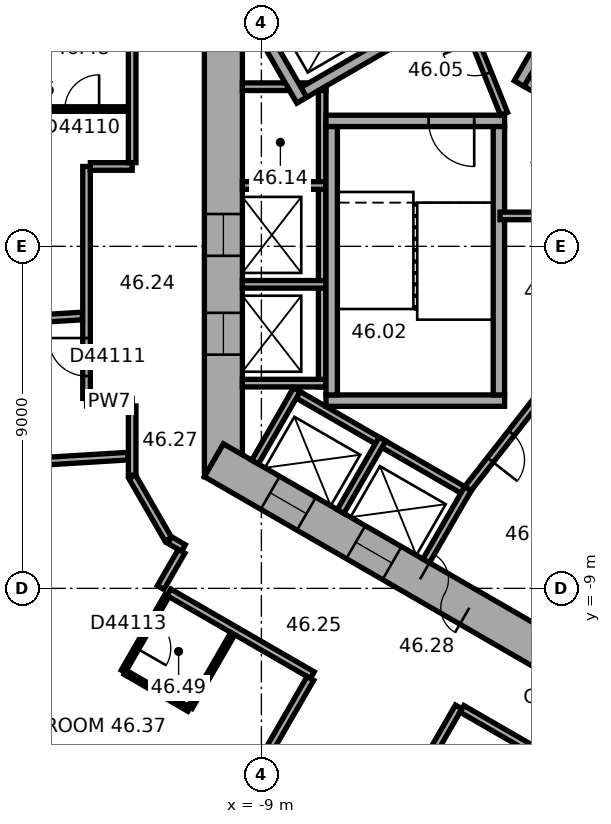
"""IFC4 building model, lengths in metres.
Left out: names, types, materials, properties, quantities, classifications, styles, units other than length and angle.
Written with IfcOpenShell. Run it as: python <this file> out.ifc"""

import sys

from ifc_helpers import new_model, si_unit, direction, frame, frame_2d, origin, place, context, subcontext, project, spatial, rectangle, extrude, element, fill, save


model = new_model("IFC4")
c1 = context("Model", 3, precision=1e-05, world=origin(), true_north=direction((0.0, 1.0)))
c2 = subcontext(c1, "Body", "Model", "MODEL_VIEW")
j1 = project(units=[si_unit("LENGTHUNIT", "METRE"), si_unit("PLANEANGLEUNIT", "RADIAN")], contexts=[c1])
p1 = place(None, origin())
s1 = spatial("IfcSite", under=j1, at=p1, CompositionType="ELEMENT")
p2 = place(p1, origin())
s2 = spatial("IfcBuilding", under=s1, at=p2, CompositionType="ELEMENT")
p3 = place(p2, frame((0.0, 0.0, 187.3)))
s3 = spatial("IfcBuildingStorey", under=s2, at=p3, CompositionType="ELEMENT", Elevation=187.3)
p4 = place(p3, frame((-10.0, 6.062, 0.0), z_axis=(0.0, 0.0, 1.0), x_axis=(0.0, -1.0, 0.0)))
e1 = element("IfcWall", 1, at=p4, inside=s3, PredefinedType="SHEAR", context=c2, shape_type="SweptSolid", body=[
    extrude(rectangle(XDim=12.125, YDim=1.0, at=frame_2d((6.062, 0.0))), origin(), (0.0, 0.0, 1.0), 3.7),
])
p5 = place(p4, frame((5.212, 0.0, 0.0)))
e2 = element("IfcOpeningElement", 2, at=p5, cuts=e1, PredefinedType="OPENING", context=c2, shape_type="SweptSolid", body=[
    extrude(rectangle(XDim=1.1, YDim=2.1, at=frame_2d((0.55, 1.05))), frame((0.0, 0.51, 0.0), z_axis=(0.0, -1.0, 0.0), x_axis=(1.0, 0.0, 0.0)), (0.0, 0.0, 1.0), 1.02),
])
p6 = place(p4, frame((7.812, 0.0, 0.0)))
e3 = element("IfcOpeningElement", 3, at=p6, cuts=e1, PredefinedType="OPENING", context=c2, shape_type="SweptSolid", body=[
    extrude(rectangle(XDim=1.1, YDim=2.1, at=frame_2d((0.55, 1.05))), frame((0.0, 0.51, 0.0), z_axis=(0.0, -1.0, 0.0), x_axis=(1.0, 0.0, 0.0)), (0.0, 0.0, 1.0), 1.02),
])
p7 = place(p3, frame((-10.25, -5.629, 0.0), z_axis=(0.0, 0.0, 1.0), x_axis=(0.866022616891, -0.50000482701, 0.0)))
e4 = element("IfcWall", 4, at=p7, inside=s3, PredefinedType="SHEAR", context=c2, shape_type="SweptSolid", body=[
    extrude(rectangle(XDim=12.125, YDim=1.0, at=frame_2d((6.062, 0.0))), origin(), (0.0, 0.0, 1.0), 3.7),
])
p8 = place(p7, frame((6.262, 0.0, 0.0)))
e5 = element("IfcOpeningElement", 5, at=p8, cuts=e4, PredefinedType="OPENING", context=c2, shape_type="SweptSolid", body=[
    extrude(rectangle(XDim=1.5, YDim=2.1, at=frame_2d((0.75, 1.05))), frame((0.0, 0.51, 0.0), z_axis=(0.0, -1.0, 0.0), x_axis=(1.0, 0.0, 0.0)), (0.0, 0.0, 1.0), 1.02),
])
p9 = place(p7, frame((1.712, 0.0, 0.0)))
e6 = element("IfcOpeningElement", 6, at=p9, cuts=e4, PredefinedType="OPENING", context=c2, shape_type="SweptSolid", body=[
    extrude(rectangle(XDim=1.1, YDim=2.1, at=frame_2d((0.55, 1.05))), frame((0.0, 0.51, 0.0), z_axis=(0.0, -1.0, 0.0), x_axis=(1.0, 0.0, 0.0)), (0.0, 0.0, 1.0), 1.02),
])
p10 = place(p7, frame((4.312, 0.0, 0.0)))
e7 = element("IfcOpeningElement", 7, at=p10, cuts=e4, PredefinedType="OPENING", context=c2, shape_type="SweptSolid", body=[
    extrude(rectangle(XDim=1.1, YDim=2.1, at=frame_2d((0.55, 1.05))), frame((0.0, 0.51, 0.0), z_axis=(0.0, -1.0, 0.0), x_axis=(1.0, 0.0, 0.0)), (0.0, 0.0, 1.0), 1.02),
])
p11 = place(p3, frame((-7.4, 4.3, 0.0), z_axis=(0.0, 0.0, 1.0), x_axis=(0.0, -1.0, 0.0)))
e8 = element("IfcWall", 8, at=p11, inside=s3, PredefinedType="PARTITIONING", context=c2, shape_type="SweptSolid", body=[
    extrude(rectangle(XDim=8.0, YDim=0.2, at=frame_2d((4.0, 0.0))), origin(), (0.0, 0.0, 1.0), 3.42),
])
for number, where, z_axis, x_axis in (
    (9, (-7.3, 4.2, 0.0), (0.0, 0.0, 1.0), (-1.0, 0.0, 0.0)),
    (10, (-7.3, 1.6, 0.0), (0.0, 0.0, 1.0), (-1.0, 0.0, 0.0)),
    (11, (-7.3, -1.0, 0.0), (0.0, 0.0, 1.0), (-1.0, 0.0, 0.0)),
    (12, (-7.3, -3.6, 0.0), (0.0, 0.0, 1.0), (-1.0, 0.0, 0.0)),
):
    element("IfcWall", number, at=place(p3, frame(where, z_axis=z_axis, x_axis=x_axis)), inside=s3, PredefinedType="PARTITIONING", context=c2, shape_type="SweptSolid", body=[
        extrude(rectangle(XDim=2.2, YDim=0.2, at=frame_2d((1.1, 0.0))), origin(), (0.0, 0.0, 1.0), 3.42),
    ])
p12 = place(p3, frame((-8.203, -3.809, 0.0), z_axis=(0.0, 0.0, 1.0), x_axis=(0.866028230842, -0.499995103361, 0.0)))
e13 = element("IfcWall", 13, at=p12, inside=s3, PredefinedType="PARTITIONING", context=c2, shape_type="SweptSolid", body=[
    extrude(rectangle(XDim=5.4, YDim=0.2, at=frame_2d((2.7, 0.0))), origin(), (0.0, 0.0, 1.0), 3.42),
])
for number, where, z_axis, x_axis in (
    (14, (-8.067, -3.772, 0.0), (0.0, 0.0, 1.0), (-0.5, -0.866, 0.0)),
    (15, (-5.815, -5.072, 0.0), (0.0, 0.0, 1.0), (-0.5, -0.866, 0.0)),
):
    element("IfcWall", number, at=place(p3, frame(where, z_axis=z_axis, x_axis=x_axis)), inside=s3, PredefinedType="PARTITIONING", context=c2, shape_type="SweptSolid", body=[
        extrude(rectangle(XDim=2.2, YDim=0.2, at=frame_2d((1.1, 0.0))), origin(), (0.0, 0.0, 1.0), 3.42),
    ])
p13 = place(p3, frame((-3.563, -6.372, 0.0), z_axis=(0.0, 0.0, 1.0), x_axis=(-0.499994660107, -0.866028486751, 0.0)))
e16 = element("IfcWall", 16, at=p13, inside=s3, PredefinedType="PARTITIONING", context=c2, shape_type="SweptSolid", body=[
    extrude(rectangle(XDim=2.2, YDim=0.2, at=frame_2d((1.1, 0.0))), origin(), (0.0, 0.0, 1.0), 3.42),
])
p14 = place(p3, frame((-2.216, 4.282, 0.0), z_axis=(0.0, 0.0, 1.0), x_axis=(0.499977259774, 0.866038532462, 0.0)))
e17 = element("IfcWall", 17, at=p14, inside=s3, PredefinedType="SHEAR", context=c2, shape_type="SweptSolid", body=[
    extrude(rectangle(XDim=4.7, YDim=0.3, at=frame_2d((2.35, 0.0))), origin(), (0.0, 0.0, 1.0), 3.42),
])
p15 = place(p3, frame((4.103, 0.807, 0.0), z_axis=(0.0, 0.0, 1.0), x_axis=(-0.866027801685, 0.499995846692, 0.0)))
e18 = element("IfcWall", 18, at=p15, inside=s3, PredefinedType="SHEAR", context=c2, shape_type="SweptSolid", body=[
    extrude(rectangle(XDim=7.06, YDim=0.3, at=frame_2d((3.53, 0.0))), origin(), (0.0, 0.0, 1.0), 3.42),
])
p16 = place(p3, frame((-2.6, 3.3, 0.0), z_axis=(0.0, 0.0, 1.0), x_axis=(-1.0, 0.0, 0.0)))
e19 = element("IfcWall", 19, at=p16, inside=s3, PredefinedType="SHEAR", context=c2, shape_type="SweptSolid", body=[
    extrude(rectangle(XDim=4.7, YDim=0.3, at=frame_2d((2.35, 0.0))), origin(), (0.0, 0.0, 1.0), 3.42),
])
p17 = place(p16, frame((0.8, 0.0, 0.0)))
e20 = element("IfcOpeningElement", 20, at=p17, cuts=e19, PredefinedType="OPENING", context=c2, shape_type="SweptSolid", body=[
    extrude(rectangle(XDim=1.2, YDim=2.1, at=frame_2d((0.6, 1.05))), frame((0.0, 0.16, 0.0), z_axis=(0.0, -1.0, 0.0), x_axis=(1.0, 0.0, 0.0)), (0.0, 0.0, 1.0), 0.32),
])
p18 = place(p3, frame((-2.6, -4.06, 0.0), z_axis=(0.0, 0.0, 1.0), x_axis=(-1.0, 0.0, 0.0)))
e21 = element("IfcWall", 21, at=p18, inside=s3, PredefinedType="SHEAR", context=c2, shape_type="SweptSolid", body=[
    extrude(rectangle(XDim=4.7, YDim=0.3, at=frame_2d((2.35, 0.0))), origin(), (0.0, 0.0, 1.0), 3.42),
])
for number, where, z_axis, x_axis in (
    (22, (-2.75, 3.15, 0.0), (0.0, 0.0, 1.0), (0.0, -1.0, 0.0)),
    (23, (-7.15, 3.15, 0.0), (0.0, 0.0, 1.0), (0.0, -1.0, 0.0)),
):
    element("IfcWall", number, at=place(p3, frame(where, z_axis=z_axis, x_axis=x_axis)), inside=s3, PredefinedType="SHEAR", context=c2, shape_type="SweptSolid", body=[
        extrude(rectangle(XDim=7.06, YDim=0.3, at=frame_2d((3.53, 0.0))), origin(), (0.0, 0.0, 1.0), 3.42),
    ])
p19 = place(p3, frame((-5.24, 5.577, 0.0), z_axis=(0.0, 0.0, 1.0), x_axis=(-0.866014461049, -0.500018952895, 0.0)))
e24 = element("IfcWall", 24, at=p19, inside=s3, PredefinedType="SHEAR", context=c2, shape_type="SweptSolid", body=[
    extrude(rectangle(XDim=3.35, YDim=0.3, at=frame_2d((1.675, 0.0))), origin(), (0.0, 0.0, 1.0), 3.42),
])
p20 = place(p3, frame((-7.937, 3.847, 0.0), z_axis=(0.0, 0.0, 1.0), x_axis=(-0.50002983664, 0.866008176907, 0.0)))
e25 = element("IfcWall", 25, at=p20, inside=s3, PredefinedType="SHEAR", context=c2, shape_type="SweptSolid", body=[
    extrude(rectangle(XDim=2.2, YDim=0.3, at=frame_2d((1.1, 0.0))), origin(), (0.0, 0.0, 1.0), 3.42),
])
p21 = place(p3, frame((-2.615, 3.487, 0.0), z_axis=(0.0, 0.0, 1.0), x_axis=(-0.373576831041, 0.92759924068, 0.0)))
e26 = element("IfcWall", 26, at=p21, inside=s3, PredefinedType="PARTITIONING", context=c2, shape_type="SweptSolid", body=[
    extrude(rectangle(XDim=3.002, YDim=0.2, at=frame_2d((1.501, 0.0))), origin(), (0.0, 0.0, 1.0), 3.42),
])
p22 = place(p21, frame((1.15, 0.0, 0.0)))
e27 = element("IfcOpeningElement", 27, at=p22, cuts=e26, PredefinedType="OPENING", context=c2, shape_type="SweptSolid", body=[
    extrude(rectangle(XDim=0.9, YDim=2.1, at=frame_2d((0.45, 1.05))), frame((0.0, 0.11, 0.0), z_axis=(0.0, -1.0, 0.0), x_axis=(1.0, 0.0, 0.0)), (0.0, 0.0, 1.0), 0.22),
])
p23 = place(p3, frame((-1.712, -4.008, 0.0), z_axis=(0.0, 0.0, 1.0), x_axis=(-0.616549420702, -0.787316208287, 0.0)))
e28 = element("IfcWall", 28, at=p23, inside=s3, PredefinedType="PARTITIONING", context=c2, shape_type="SweptSolid", body=[
    extrude(rectangle(XDim=3.002, YDim=0.2, at=frame_2d((1.501, 0.0))), origin(), (0.0, 0.0, 1.0), 3.42),
])
p24 = place(p23, frame((1.15, 0.0, 0.0)))
e29 = element("IfcOpeningElement", 29, at=p24, cuts=e28, PredefinedType="OPENING", context=c2, shape_type="SweptSolid", body=[
    extrude(rectangle(XDim=0.9, YDim=2.1, at=frame_2d((0.45, 1.05))), frame((0.0, 0.11, 0.0), z_axis=(0.0, -1.0, 0.0), x_axis=(1.0, 0.0, 0.0)), (0.0, 0.0, 1.0), 0.22),
])
p25 = place(p3, frame((0.92, 0.8, 0.0), z_axis=(0.0, 0.0, 1.0), x_axis=(-1.0, 0.0, 0.0)))
e30 = element("IfcWall", 30, at=p25, inside=s3, PredefinedType="PARTITIONING", context=c2, shape_type="SweptSolid", body=[
    extrude(rectangle(XDim=3.64, YDim=0.2, at=frame_2d((1.82, 0.0))), origin(), (0.0, 0.0, 1.0), 3.42),
])
p26 = place(p3, frame((-20.651, -2.258, 0.0), z_axis=(0.0, 0.0, 1.0), x_axis=(0.998133960965, 0.061062230286, 0.0)))
e31 = element("IfcWall", 31, at=p26, inside=s3, PredefinedType="PARTITIONING", context=c2, shape_type="SweptSolid", body=[
    extrude(rectangle(XDim=6.953, YDim=0.2, at=frame_2d((3.477, 0.0))), origin(), (0.0, 0.0, 1.0), 3.42),
])
p27 = place(p3, frame((-20.421, -6.005, 0.0), z_axis=(0.0, 0.0, 1.0), x_axis=(0.998134865741, 0.061047438866, 0.0)))
e32 = element("IfcWall", 32, at=p27, inside=s3, PredefinedType="PARTITIONING", context=c2, shape_type="SweptSolid", body=[
    extrude(rectangle(XDim=7.927, YDim=0.2, at=frame_2d((3.963, 0.0))), origin(), (0.0, 0.0, 1.0), 2.87),
])
p28 = place(p3, frame((-13.601, -4.101, 0.0), z_axis=(0.0, 0.0, 1.0), x_axis=(1.0, 0.0, 0.0)))
e33 = element("IfcWall", 33, at=p28, inside=s3, PredefinedType="PARTITIONING", context=c2, shape_type="SweptSolid", body=[
    extrude(rectangle(XDim=1.201, YDim=0.2, at=frame_2d((0.601, 0.0))), origin(), (0.0, 0.0, 1.0), 3.42),
])
p29 = place(p3, frame((-13.601, 2.101, 0.0), z_axis=(0.0, 0.0, 1.0), x_axis=(0.0, -1.0, 0.0)))
e34 = element("IfcWall", 34, at=p29, inside=s3, PredefinedType="PARTITIONING", context=c2, shape_type="SweptSolid", body=[
    extrude(rectangle(XDim=6.102, YDim=0.2, at=frame_2d((3.051, 0.0))), origin(), (0.0, 0.0, 1.0), 3.42),
])
p30 = place(p29, frame((4.515, 0.0, 0.0)))
e35 = element("IfcOpeningElement", 35, at=p30, cuts=e34, PredefinedType="OPENING", context=c2, shape_type="SweptSolid", body=[
    extrude(rectangle(XDim=1.0, YDim=2.1, at=frame_2d((0.5, 1.05))), frame((0.0, 0.11, 0.0), z_axis=(0.0, -1.0, 0.0), x_axis=(1.0, 0.0, 0.0)), (0.0, 0.0, 1.0), 0.22),
])
p31 = place(p3, frame((-12.635, -11.182, 0.0), z_axis=(0.0, 0.0, 1.0), x_axis=(0.499952165731, 0.866053019151, 0.0)))
e36 = element("IfcWall", 36, at=p31, inside=s3, PredefinedType="PARTITIONING", context=c2, shape_type="SweptSolid", body=[
    extrude(rectangle(XDim=2.3, YDim=0.12, at=frame_2d((1.15, 0.0))), origin(), (0.0, 0.0, 1.0), 3.42),
])
p32 = place(p31, frame((0.7, 0.0, 0.0)))
e37 = element("IfcOpeningElement", 37, at=p32, cuts=e36, PredefinedType="OPENING", context=c2, shape_type="SweptSolid", body=[
    extrude(rectangle(XDim=0.9, YDim=2.1, at=frame_2d((0.45, 1.05))), frame((0.0, 0.07, 0.0), z_axis=(0.0, -1.0, 0.0), x_axis=(1.0, 0.0, 0.0)), (0.0, 0.0, 1.0), 0.14),
])
p33 = place(p3, frame((-12.5, 3.612, 0.0), z_axis=(0.0, 0.0, 1.0), x_axis=(-1.0, 0.0, 0.0)))
e38 = element("IfcWall", 38, at=p33, inside=s3, PredefinedType="PARTITIONING", context=c2, shape_type="SweptSolid", body=[
    extrude(rectangle(XDim=2.44, YDim=0.12, at=frame_2d((1.22, 0.0))), origin(), (0.0, 0.0, 1.0), 3.42),
])
p34 = place(p33, frame((0.77, 0.0, 0.0)))
e39 = element("IfcOpeningElement", 39, at=p34, cuts=e38, PredefinedType="OPENING", context=c2, shape_type="SweptSolid", body=[
    extrude(rectangle(XDim=0.9, YDim=2.1, at=frame_2d((0.45, 1.05))), frame((0.0, 0.07, 0.0), z_axis=(0.0, -1.0, 0.0), x_axis=(1.0, 0.0, 0.0)), (0.0, 0.0, 1.0), 0.14),
])
p35 = place(p3, frame((-12.4, -6.062, 0.0), z_axis=(0.0, 0.0, 1.0), x_axis=(0.500022797313, -0.86601224135, 0.0)))
e40 = element("IfcWall", 40, at=p35, inside=s3, PredefinedType="PARTITIONING", context=c2, shape_type="SweptSolid", body=[
    extrude(rectangle(XDim=1.9, YDim=0.2, at=frame_2d((0.95, 0.0))), origin(), (0.0, 0.0, 1.0), 3.42),
])
p36 = place(p3, frame((-12.4, -4.201, 0.0), z_axis=(0.0, 0.0, 1.0), x_axis=(0.0, -1.0, 0.0)))
e41 = element("IfcWall", 41, at=p36, inside=s3, PredefinedType="PARTITIONING", context=c2, shape_type="SweptSolid", body=[
    extrude(rectangle(XDim=1.821, YDim=0.2, at=frame_2d((0.911, 0.0))), origin(), (0.0, 0.0, 1.0), 3.42),
])
p37 = place(p3, frame((-12.4, 2.101, 0.0), z_axis=(0.0, 0.0, 1.0), x_axis=(-1.0, 0.0, 0.0)))
e42 = element("IfcWall", 42, at=p37, inside=s3, PredefinedType="PARTITIONING", context=c2, shape_type="SweptSolid", body=[
    extrude(rectangle(XDim=1.101, YDim=0.2, at=frame_2d((0.551, 0.0))), origin(), (0.0, 0.0, 1.0), 3.42),
])
p38 = place(p3, frame((-12.4, 5.812, 0.0), z_axis=(0.0, 0.0, 1.0), x_axis=(0.0, -1.0, 0.0)))
e43 = element("IfcWall", 43, at=p38, inside=s3, PredefinedType="PARTITIONING", context=c2, shape_type="SweptSolid", body=[
    extrude(rectangle(XDim=3.611, YDim=0.2, at=frame_2d((1.806, 0.0))), origin(), (0.0, 0.0, 1.0), 3.42),
])
p39 = place(p3, frame((-11.435, -9.103, 0.0), z_axis=(0.0, 0.0, 1.0), x_axis=(0.866007399799, -0.500031182522, 0.0)))
e44 = element("IfcWall", 44, at=p39, inside=s3, PredefinedType="PARTITIONING", context=c2, shape_type="SweptSolid", body=[
    extrude(rectangle(XDim=4.358, YDim=0.2, at=frame_2d((2.179, 0.0))), origin(), (0.0, 0.0, 1.0), 3.42),
])
p40 = place(p3, frame((-11.415, -7.728, 0.0), z_axis=(0.0, 0.0, 1.0), x_axis=(0.865915281873, -0.500190688257, 0.0)))
e45 = element("IfcWall", 45, at=p40, inside=s3, PredefinedType="PARTITIONING", context=c2, shape_type="SweptSolid", body=[
    extrude(rectangle(XDim=0.421, YDim=0.2, at=frame_2d((0.21, 0.0))), origin(), (0.0, 0.0, 1.0), 3.42),
])
p41 = place(p3, frame((-11.235, -17.474, 0.0), z_axis=(0.0, 0.0, 1.0), x_axis=(0.500009260695, 0.866020057054, 0.0)))
e46 = element("IfcWall", 46, at=p41, inside=s3, PredefinedType="PARTITIONING", context=c2, shape_type="SweptSolid", body=[
    extrude(rectangle(XDim=7.049, YDim=0.2, at=frame_2d((3.524, 0.0))), origin(), (0.0, 0.0, 1.0), 2.87),
])
p42 = place(p41, frame((3.024, 0.0, 0.0)))
e47 = element("IfcOpeningElement", 47, at=p42, cuts=e46, PredefinedType="OPENING", context=c2, shape_type="SweptSolid", body=[
    extrude(rectangle(XDim=1.0, YDim=2.1, at=frame_2d((0.5, 1.05))), frame((0.0, 0.11, 0.0), z_axis=(0.0, -1.0, 0.0), x_axis=(1.0, 0.0, 0.0)), (0.0, 0.0, 1.0), 0.22),
])
p43 = place(p3, frame((-11.101, -8.025, 0.0), z_axis=(0.0, 0.0, 1.0), x_axis=(-0.500074377092, -0.865982457891, 0.0)))
e48 = element("IfcWall", 48, at=p43, inside=s3, PredefinedType="PARTITIONING", context=c2, shape_type="SweptSolid", body=[
    extrude(rectangle(XDim=1.101, YDim=0.2, at=frame_2d((0.55, 0.0))), origin(), (0.0, 0.0, 1.0), 3.42),
])
p44 = place(p3, frame((-10.903, -12.182, 0.0), z_axis=(0.0, 0.0, 1.0), x_axis=(-0.866011626733, 0.500023861795, 0.0)))
e49 = element("IfcWall", 49, at=p44, inside=s3, PredefinedType="PARTITIONING", context=c2, shape_type="SweptSolid", body=[
    extrude(rectangle(XDim=1.94, YDim=0.12, at=frame_2d((0.97, 0.0))), origin(), (0.0, 0.0, 1.0), 3.42),
])
p45 = place(p3, frame((-9.753, -10.19, 0.0), z_axis=(0.0, 0.0, 1.0), x_axis=(-0.49994888933, -0.866054910533, 0.0)))
e50 = element("IfcWall", 50, at=p45, inside=s3, PredefinedType="PARTITIONING", context=c2, shape_type="SweptSolid", body=[
    extrude(rectangle(XDim=2.24, YDim=0.12, at=frame_2d((1.12, 0.0))), origin(), (0.0, 0.0, 1.0), 3.42),
])
p46 = place(p3, frame((-7.984, -19.351, 0.0), z_axis=(0.0, 0.0, 1.0), x_axis=(0.500010139422, 0.866019549707, 0.0)))
e51 = element("IfcWall", 51, at=p46, inside=s3, PredefinedType="PARTITIONING", context=c2, shape_type="SweptSolid", body=[
    extrude(rectangle(XDim=8.35, YDim=0.2, at=frame_2d((4.175, 0.0))), origin(), (0.0, 0.0, 1.0), 3.42),
])
p47 = place(p46, frame((3.675, 0.0, 0.0)))
e52 = element("IfcOpeningElement", 52, at=p47, cuts=e51, PredefinedType="OPENING", context=c2, shape_type="SweptSolid", body=[
    extrude(rectangle(XDim=1.0, YDim=2.1, at=frame_2d((0.5, 1.05))), frame((0.0, 0.11, 0.0), z_axis=(0.0, -1.0, 0.0), x_axis=(1.0, 0.0, 0.0)), (0.0, 0.0, 1.0), 0.22),
])
p48 = place(p3, frame((-3.722, -12.169, 0.0), z_axis=(0.0, 0.0, 1.0), x_axis=(0.866033163891, -0.499986558861, 0.0)))
e53 = element("IfcWall", 53, at=p48, inside=s3, PredefinedType="PARTITIONING", context=c2, shape_type="SweptSolid", body=[
    extrude(rectangle(XDim=3.201, YDim=0.2, at=frame_2d((1.6, 0.0))), origin(), (0.0, 0.0, 1.0), 3.42),
])
p49 = place(p8, origin())
e54 = element("IfcDoor", 54, at=p49, inside=s3, OperationType="DOUBLE_DOOR_SINGLE_SWING", PredefinedType="DOOR", context=c2, shape_type="SweptSolid", body=[
    extrude(rectangle(XDim=1.5, YDim=2.1, at=frame_2d((0.75, 1.05))), frame((0.0, 0.025, 0.0), z_axis=(0.0, -1.0, 0.0), x_axis=(1.0, 0.0, 0.0)), (0.0, 0.0, 1.0), 0.05),
])
fill(e5, e54)
p50 = place(p17, origin())
e55 = element("IfcDoor", 55, at=p50, inside=s3, OperationType="SINGLE_SWING_RIGHT", PredefinedType="DOOR", context=c2, shape_type="SweptSolid", body=[
    extrude(rectangle(XDim=1.2, YDim=2.1, at=frame_2d((0.6, 1.05))), frame((0.0, 0.025, 0.0), z_axis=(0.0, -1.0, 0.0), x_axis=(1.0, 0.0, 0.0)), (0.0, 0.0, 1.0), 0.05),
])
fill(e20, e55)
p51 = place(p22, origin())
e56 = element("IfcDoor", 56, at=p51, inside=s3, OperationType="SINGLE_SWING_LEFT", PredefinedType="DOOR", context=c2, shape_type="SweptSolid", body=[
    extrude(rectangle(XDim=0.9, YDim=2.1, at=frame_2d((0.45, 1.05))), frame((0.0, 0.025, 0.0), z_axis=(0.0, -1.0, 0.0), x_axis=(1.0, 0.0, 0.0)), (0.0, 0.0, 1.0), 0.05),
])
fill(e27, e56)
p52 = place(p24, origin())
e57 = element("IfcDoor", 57, at=p52, inside=s3, OperationType="SINGLE_SWING_LEFT", PredefinedType="DOOR", context=c2, shape_type="SweptSolid", body=[
    extrude(rectangle(XDim=0.9, YDim=2.1, at=frame_2d((0.45, 1.05))), frame((0.0, 0.025, 0.0), z_axis=(0.0, -1.0, 0.0), x_axis=(1.0, 0.0, 0.0)), (0.0, 0.0, 1.0), 0.05),
])
fill(e29, e57)
p53 = place(p5, origin())
e58 = element("IfcDoor", 58, at=p53, inside=s3, OperationType="DOUBLE_DOOR_SLIDING", PredefinedType="DOOR", context=c2, shape_type="SweptSolid", body=[
    extrude(rectangle(XDim=1.1, YDim=2.1, at=frame_2d((0.55, 1.05))), frame((0.0, 0.025, 0.0), z_axis=(0.0, -1.0, 0.0), x_axis=(1.0, 0.0, 0.0)), (0.0, 0.0, 1.0), 0.05),
])
fill(e2, e58)
p54 = place(p6, origin())
e59 = element("IfcDoor", 59, at=p54, inside=s3, OperationType="DOUBLE_DOOR_SLIDING", PredefinedType="DOOR", context=c2, shape_type="SweptSolid", body=[
    extrude(rectangle(XDim=1.1, YDim=2.1, at=frame_2d((0.55, 1.05))), frame((0.0, 0.025, 0.0), z_axis=(0.0, -1.0, 0.0), x_axis=(1.0, 0.0, 0.0)), (0.0, 0.0, 1.0), 0.05),
])
fill(e3, e59)
p55 = place(p9, origin())
e60 = element("IfcDoor", 60, at=p55, inside=s3, OperationType="DOUBLE_DOOR_SLIDING", PredefinedType="DOOR", context=c2, shape_type="SweptSolid", body=[
    extrude(rectangle(XDim=1.1, YDim=2.1, at=frame_2d((0.55, 1.05))), frame((0.0, 0.025, 0.0), z_axis=(0.0, -1.0, 0.0), x_axis=(1.0, 0.0, 0.0)), (0.0, 0.0, 1.0), 0.05),
])
fill(e6, e60)
p56 = place(p10, origin())
e61 = element("IfcDoor", 61, at=p56, inside=s3, OperationType="DOUBLE_DOOR_SLIDING", PredefinedType="DOOR", context=c2, shape_type="SweptSolid", body=[
    extrude(rectangle(XDim=1.1, YDim=2.1, at=frame_2d((0.55, 1.05))), frame((0.0, 0.025, 0.0), z_axis=(0.0, -1.0, 0.0), x_axis=(1.0, 0.0, 0.0)), (0.0, 0.0, 1.0), 0.05),
])
fill(e7, e61)
p57 = place(p34, origin())
e62 = element("IfcDoor", 62, at=p57, inside=s3, OperationType="SINGLE_SWING_LEFT", PredefinedType="DOOR", context=c2, shape_type="SweptSolid", body=[
    extrude(rectangle(XDim=0.9, YDim=2.1, at=frame_2d((0.45, 1.05))), frame((0.0, 0.025, 0.0), z_axis=(0.0, -1.0, 0.0), x_axis=(1.0, 0.0, 0.0)), (0.0, 0.0, 1.0), 0.05),
])
fill(e39, e62)
p58 = place(p30, origin())
e63 = element("IfcDoor", 63, at=p58, inside=s3, OperationType="SINGLE_SWING_LEFT", PredefinedType="DOOR", context=c2, shape_type="SweptSolid", body=[
    extrude(rectangle(XDim=1.0, YDim=2.1, at=frame_2d((0.5, 1.05))), frame((0.0, 0.025, 0.0), z_axis=(0.0, -1.0, 0.0), x_axis=(1.0, 0.0, 0.0)), (0.0, 0.0, 1.0), 0.05),
])
fill(e35, e63)
p59 = place(p32, origin())
e64 = element("IfcDoor", 64, at=p59, inside=s3, OperationType="SINGLE_SWING_LEFT", PredefinedType="DOOR", context=c2, shape_type="SweptSolid", body=[
    extrude(rectangle(XDim=0.9, YDim=2.1, at=frame_2d((0.45, 1.05))), frame((0.0, 0.025, 0.0), z_axis=(0.0, -1.0, 0.0), x_axis=(1.0, 0.0, 0.0)), (0.0, 0.0, 1.0), 0.05),
])
fill(e37, e64)
save(model, sys.argv[1])
